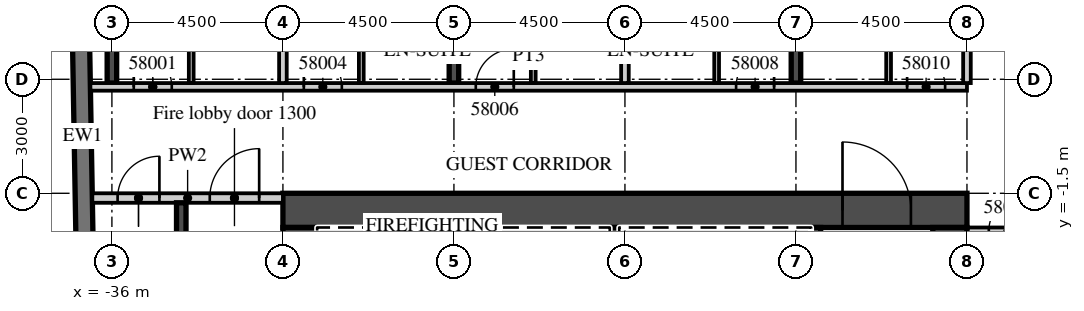
"""IFC4 building model, lengths in metres.
Left out: names, types, materials, properties, quantities, classifications, styles, units other than length and angle.
Written with IfcOpenShell. Run it as: python <this file> out.ifc"""

import sys

from ifc_helpers import new_model, si_unit, direction, frame, frame_2d, origin, place, context, subcontext, project, spatial, rectangle, extrude, element, fill, save


model = new_model("IFC4")
c1 = context("Model", 3, precision=1e-05, world=origin(), true_north=direction((0.0, 1.0)))
c2 = subcontext(c1, "Body", "Model", "MODEL_VIEW")
j1 = project(units=[si_unit("LENGTHUNIT", "METRE"), si_unit("PLANEANGLEUNIT", "RADIAN")], contexts=[c1])
p1 = place(None, origin())
s1 = spatial("IfcSite", under=j1, at=p1, CompositionType="ELEMENT")
p2 = place(p1, origin())
s2 = spatial("IfcBuilding", under=s1, at=p2, CompositionType="ELEMENT")
p3 = place(p2, frame((0.0, 0.0, 237.5)))
s3 = spatial("IfcBuildingStorey", under=s2, at=p3, CompositionType="ELEMENT", Elevation=237.5)
p4 = place(p3, frame((-36.0, 1.4, 0.0), z_axis=(0.0, 0.0, 1.0), x_axis=(0.0, 1.0, 0.0)))
e1 = element("IfcWall", 1, at=p4, inside=s3, PredefinedType="SHEAR", context=c2, shape_type="SweptSolid", body=[
    extrude(rectangle(XDim=17.125, YDim=0.25, at=frame_2d((8.563, 0.0))), origin(), (0.0, 0.0, 1.0), 3.3),
])
p5 = place(p3, frame((-27.0, 1.4, 0.0), z_axis=(0.0, 0.0, 1.0), x_axis=(0.0, 1.0, 0.0)))
e2 = element("IfcWall", 2, at=p5, inside=s3, PredefinedType="SHEAR", context=c2, shape_type="SweptSolid", body=[
    extrude(rectangle(XDim=18.817, YDim=0.25, at=frame_2d((9.409, 0.0))), origin(), (0.0, 0.0, 1.0), 3.3),
])
p6 = place(p3, frame((-18.0, 1.4, 0.0), z_axis=(0.0, 0.0, 1.0), x_axis=(0.0, 1.0, 0.0)))
e3 = element("IfcWall", 3, at=p6, inside=s3, PredefinedType="SHEAR", context=c2, shape_type="SweptSolid", body=[
    extrude(rectangle(XDim=18.974, YDim=0.25, at=frame_2d((9.487, 0.0))), origin(), (0.0, 0.0, 1.0), 3.3),
])
p7 = place(p3, frame((-37.057, 16.503, 0.0), z_axis=(0.0, 0.0, 1.0), x_axis=(0.017452279857, -0.999847697366, 0.0)))
e4 = element("IfcWall", 4, at=p7, inside=s3, PredefinedType="SOLIDWALL", context=c2, shape_type="SweptSolid", body=[
    extrude(rectangle(XDim=33.0, YDim=0.45, at=frame_2d((16.5, 0.0))), origin(), (0.0, 0.0, 1.0), 3.02),
])
p8 = place(p3, frame((-36.566, 1.3, 0.0), z_axis=(0.0, 0.0, 1.0), x_axis=(1.0, 0.0, 0.0)))
e5 = element("IfcWall", 5, at=p8, inside=s3, PredefinedType="PARTITIONING", context=c2, shape_type="SweptSolid", body=[
    extrude(rectangle(XDim=23.066, YDim=0.2, at=frame_2d((11.533, 0.0))), origin(), (0.0, 0.0, 1.0), 3.02),
])
p9 = place(p8, frame((1.141, 0.0, 0.0)))
e6 = element("IfcOpeningElement", 6, at=p9, cuts=e5, PredefinedType="OPENING", context=c2, shape_type="SweptSolid", body=[
    extrude(rectangle(XDim=1.0, YDim=2.1, at=frame_2d((0.5, 1.05))), frame((0.0, 0.11, 0.0), z_axis=(0.0, -1.0, 0.0), x_axis=(1.0, 0.0, 0.0)), (0.0, 0.0, 1.0), 0.22),
])
p10 = place(p8, frame((5.616, 0.0, 0.0)))
e7 = element("IfcOpeningElement", 7, at=p10, cuts=e5, PredefinedType="OPENING", context=c2, shape_type="SweptSolid", body=[
    extrude(rectangle(XDim=1.0, YDim=2.1, at=frame_2d((0.5, 1.05))), frame((0.0, 0.11, 0.0), z_axis=(0.0, -1.0, 0.0), x_axis=(1.0, 0.0, 0.0)), (0.0, 0.0, 1.0), 0.22),
])
p11 = place(p8, frame((10.141, 0.0, 0.0)))
e8 = element("IfcOpeningElement", 8, at=p11, cuts=e5, PredefinedType="OPENING", context=c2, shape_type="SweptSolid", body=[
    extrude(rectangle(XDim=1.0, YDim=2.1, at=frame_2d((0.5, 1.05))), frame((0.0, 0.11, 0.0), z_axis=(0.0, -1.0, 0.0), x_axis=(1.0, 0.0, 0.0)), (0.0, 0.0, 1.0), 0.22),
])
p12 = place(p8, frame((16.991, 0.0, 0.0)))
e9 = element("IfcOpeningElement", 9, at=p12, cuts=e5, PredefinedType="OPENING", context=c2, shape_type="SweptSolid", body=[
    extrude(rectangle(XDim=1.0, YDim=2.1, at=frame_2d((0.5, 1.05))), frame((0.0, 0.11, 0.0), z_axis=(0.0, -1.0, 0.0), x_axis=(1.0, 0.0, 0.0)), (0.0, 0.0, 1.0), 0.22),
])
p13 = place(p8, frame((21.491, 0.0, 0.0)))
e10 = element("IfcOpeningElement", 10, at=p13, cuts=e5, PredefinedType="OPENING", context=c2, shape_type="SweptSolid", body=[
    extrude(rectangle(XDim=1.0, YDim=2.1, at=frame_2d((0.5, 1.05))), frame((0.0, 0.11, 0.0), z_axis=(0.0, -1.0, 0.0), x_axis=(1.0, 0.0, 0.0)), (0.0, 0.0, 1.0), 0.22),
])
p14 = place(p3, frame((-31.5, 1.4, 0.0), z_axis=(0.0, 0.0, 1.0), x_axis=(0.0, 1.0, 0.0)))
e11 = element("IfcWall", 11, at=p14, inside=s3, PredefinedType="PARTITIONING", context=c2, shape_type="SweptSolid", body=[
    extrude(rectangle(XDim=18.751, YDim=0.2, at=frame_2d((9.375, 0.0))), origin(), (0.0, 0.0, 1.0), 3.02),
])
p15 = place(p3, frame((-33.913, 1.4, 0.0), z_axis=(0.0, 0.0, 1.0), x_axis=(0.0, 1.0, 0.0)))
e12 = element("IfcWall", 12, at=p15, inside=s3, PredefinedType="PARTITIONING", context=c2, shape_type="SweptSolid", body=[
    extrude(rectangle(XDim=3.725, YDim=0.125, at=frame_2d((1.863, 0.0))), origin(), (0.0, 0.0, 1.0), 3.02),
])
p16 = place(p15, frame((2.45, 0.0, 0.0)))
e13 = element("IfcOpeningElement", 13, at=p16, cuts=e12, PredefinedType="OPENING", context=c2, shape_type="SweptSolid", body=[
    extrude(rectangle(XDim=0.9, YDim=2.1, at=frame_2d((0.45, 1.05))), frame((0.0, 0.073, 0.0), z_axis=(0.0, -1.0, 0.0), x_axis=(1.0, 0.0, 0.0)), (0.0, 0.0, 1.0), 0.145),
])
p17 = place(p3, frame((-29.438, 1.4, 0.0), z_axis=(0.0, 0.0, 1.0), x_axis=(0.0, 1.0, 0.0)))
e14 = element("IfcWall", 14, at=p17, inside=s3, PredefinedType="PARTITIONING", context=c2, shape_type="SweptSolid", body=[
    extrude(rectangle(XDim=3.725, YDim=0.125, at=frame_2d((1.863, 0.0))), origin(), (0.0, 0.0, 1.0), 3.02),
])
p18 = place(p17, frame((2.45, 0.0, 0.0)))
e15 = element("IfcOpeningElement", 15, at=p18, cuts=e14, PredefinedType="OPENING", context=c2, shape_type="SweptSolid", body=[
    extrude(rectangle(XDim=0.9, YDim=2.1, at=frame_2d((0.45, 1.05))), frame((0.0, 0.073, 0.0), z_axis=(0.0, -1.0, 0.0), x_axis=(1.0, 0.0, 0.0)), (0.0, 0.0, 1.0), 0.145),
])
p19 = place(p3, frame((-22.5, 1.4, 0.0), z_axis=(0.0, 0.0, 1.0), x_axis=(0.0, 1.0, 0.0)))
e16 = element("IfcWall", 16, at=p19, inside=s3, PredefinedType="PARTITIONING", context=c2, shape_type="SweptSolid", body=[
    extrude(rectangle(XDim=18.908, YDim=0.2, at=frame_2d((9.454, 0.0))), origin(), (0.0, 0.0, 1.0), 3.02),
])
p20 = place(p3, frame((-24.913, 1.4, 0.0), z_axis=(0.0, 0.0, 1.0), x_axis=(0.0, 1.0, 0.0)))
e17 = element("IfcWall", 17, at=p20, inside=s3, PredefinedType="PARTITIONING", context=c2, shape_type="SweptSolid", body=[
    extrude(rectangle(XDim=3.725, YDim=0.125, at=frame_2d((1.863, 0.0))), origin(), (0.0, 0.0, 1.0), 3.02),
])
p21 = place(p20, frame((2.45, 0.0, 0.0)))
e18 = element("IfcOpeningElement", 18, at=p21, cuts=e17, PredefinedType="OPENING", context=c2, shape_type="SweptSolid", body=[
    extrude(rectangle(XDim=0.9, YDim=2.1, at=frame_2d((0.45, 1.05))), frame((0.0, 0.073, 0.0), z_axis=(0.0, -1.0, 0.0), x_axis=(1.0, 0.0, 0.0)), (0.0, 0.0, 1.0), 0.145),
])
p22 = place(p3, frame((-20.087, 1.4, 0.0), z_axis=(0.0, 0.0, 1.0), x_axis=(0.0, 1.0, 0.0)))
e19 = element("IfcWall", 19, at=p22, inside=s3, PredefinedType="PARTITIONING", context=c2, shape_type="SweptSolid", body=[
    extrude(rectangle(XDim=3.725, YDim=0.125, at=frame_2d((1.863, 0.0))), origin(), (0.0, 0.0, 1.0), 3.02),
])
p23 = place(p22, frame((2.45, 0.0, 0.0)))
e20 = element("IfcOpeningElement", 20, at=p23, cuts=e19, PredefinedType="OPENING", context=c2, shape_type="SweptSolid", body=[
    extrude(rectangle(XDim=0.9, YDim=2.1, at=frame_2d((0.45, 1.05))), frame((0.0, 0.073, 0.0), z_axis=(0.0, -1.0, 0.0), x_axis=(1.0, 0.0, 0.0)), (0.0, 0.0, 1.0), 0.145),
])
p24 = place(p3, frame((-13.5, 1.4, 0.0), z_axis=(0.0, 0.0, 1.0), x_axis=(0.0, 1.0, 0.0)))
e21 = element("IfcWall", 21, at=p24, inside=s3, PredefinedType="PARTITIONING", context=c2, shape_type="SweptSolid", body=[
    extrude(rectangle(XDim=19.065, YDim=0.2, at=frame_2d((9.533, 0.0))), origin(), (0.0, 0.0, 1.0), 3.02),
])
p25 = place(p3, frame((-15.562, 1.4, 0.0), z_axis=(0.0, 0.0, 1.0), x_axis=(0.0, 1.0, 0.0)))
e22 = element("IfcWall", 22, at=p25, inside=s3, PredefinedType="PARTITIONING", context=c2, shape_type="SweptSolid", body=[
    extrude(rectangle(XDim=3.725, YDim=0.125, at=frame_2d((1.863, 0.0))), origin(), (0.0, 0.0, 1.0), 3.02),
])
p26 = place(p25, frame((2.45, 0.0, 0.0)))
e23 = element("IfcOpeningElement", 23, at=p26, cuts=e22, PredefinedType="OPENING", context=c2, shape_type="SweptSolid", body=[
    extrude(rectangle(XDim=0.9, YDim=2.1, at=frame_2d((0.45, 1.05))), frame((0.0, 0.073, 0.0), z_axis=(0.0, -1.0, 0.0), x_axis=(1.0, 0.0, 0.0)), (0.0, 0.0, 1.0), 0.145),
])
p27 = place(p3, frame((-13.5, -2.5, 0.0), z_axis=(0.0, 0.0, 1.0), x_axis=(1.0, 0.0, 0.0)))
e24 = element("IfcWall", 24, at=p27, inside=s3, PredefinedType="PARTITIONING", context=c2, shape_type="SweptSolid", body=[
    extrude(rectangle(XDim=27.0, YDim=0.2, at=frame_2d((13.5, 0.0))), origin(), (0.0, 0.0, 1.0), 3.02),
])
p28 = place(p27, frame((0.575, 0.0, 0.0)))
e25 = element("IfcOpeningElement", 25, at=p28, cuts=e24, PredefinedType="OPENING", context=c2, shape_type="SweptSolid", body=[
    extrude(rectangle(XDim=1.0, YDim=2.1, at=frame_2d((0.5, 1.05))), frame((0.0, 0.11, 0.0), z_axis=(0.0, -1.0, 0.0), x_axis=(1.0, 0.0, 0.0)), (0.0, 0.0, 1.0), 0.22),
])
p29 = place(p27, frame((9.863, 0.0, 0.0)))
e26 = element("IfcOpeningElement", 26, at=p29, cuts=e24, PredefinedType="OPENING", context=c2, shape_type="SweptSolid", body=[
    extrude(rectangle(XDim=1.2, YDim=2.1, at=frame_2d((0.6, 1.05))), frame((0.0, 0.11, 0.0), z_axis=(0.0, -1.0, 0.0), x_axis=(1.0, 0.0, 0.0)), (0.0, 0.0, 1.0), 0.22),
])
p30 = place(p27, frame((15.938, 0.0, 0.0)))
e27 = element("IfcOpeningElement", 27, at=p30, cuts=e24, PredefinedType="OPENING", context=c2, shape_type="SweptSolid", body=[
    extrude(rectangle(XDim=1.2, YDim=2.1, at=frame_2d((0.6, 1.05))), frame((0.0, 0.11, 0.0), z_axis=(0.0, -1.0, 0.0), x_axis=(1.0, 0.0, 0.0)), (0.0, 0.0, 1.0), 0.22),
])
p31 = place(p27, frame((23.075, 0.0, 0.0)))
e28 = element("IfcOpeningElement", 28, at=p31, cuts=e24, PredefinedType="OPENING", context=c2, shape_type="SweptSolid", body=[
    extrude(rectangle(XDim=1.0, YDim=2.1, at=frame_2d((0.5, 1.05))), frame((0.0, 0.11, 0.0), z_axis=(0.0, -1.0, 0.0), x_axis=(1.0, 0.0, 0.0)), (0.0, 0.0, 1.0), 0.22),
])
p32 = place(p3, frame((-31.5, -1.95, 0.0), z_axis=(0.0, 0.0, 1.0), x_axis=(1.0, 0.0, 0.0)))
e29 = element("IfcWall", 29, at=p32, inside=s3, PredefinedType="SHEAR", context=c2, shape_type="SweptSolid", body=[
    extrude(rectangle(XDim=18.0, YDim=0.9, at=frame_2d((9.0, 0.0))), origin(), (0.0, 0.0, 1.0), 3.02),
])
p33 = place(p32, frame((14.725, 0.0, 0.0)))
e30 = element("IfcOpeningElement", 30, at=p33, cuts=e29, PredefinedType="OPENING", context=c2, shape_type="SweptSolid", body=[
    extrude(rectangle(XDim=1.8, YDim=2.1, at=frame_2d((0.9, 1.05))), frame((0.0, 0.46, 0.0), z_axis=(0.0, -1.0, 0.0), x_axis=(1.0, 0.0, 0.0)), (0.0, 0.0, 1.0), 0.92),
])
p34 = place(p3, frame((-31.05, -15.2, 0.0), z_axis=(0.0, 0.0, 1.0), x_axis=(0.0, 1.0, 0.0)))
e31 = element("IfcWall", 31, at=p34, inside=s3, PredefinedType="SHEAR", context=c2, shape_type="SweptSolid", body=[
    extrude(rectangle(XDim=12.8, YDim=0.9, at=frame_2d((6.4, 0.0))), origin(), (0.0, 0.0, 1.0), 3.02),
])
p35 = place(p34, frame((11.5, 0.0, 0.0)))
e32 = element("IfcOpeningElement", 32, at=p35, cuts=e31, PredefinedType="OPENING", context=c2, shape_type="SweptSolid", body=[
    extrude(rectangle(XDim=1.1, YDim=2.1, at=frame_2d((0.55, 1.05))), frame((0.0, 0.46, 0.0), z_axis=(0.0, -1.0, 0.0), x_axis=(1.0, 0.0, 0.0)), (0.0, 0.0, 1.0), 0.92),
])
p36 = place(p3, frame((-13.95, -14.6, 0.0), z_axis=(0.0, 0.0, 1.0), x_axis=(0.0, 1.0, 0.0)))
e33 = element("IfcWall", 33, at=p36, inside=s3, PredefinedType="SHEAR", context=c2, shape_type="SweptSolid", body=[
    extrude(rectangle(XDim=12.2, YDim=0.9, at=frame_2d((6.1, 0.0))), origin(), (0.0, 0.0, 1.0), 3.02),
])
p37 = place(p3, frame((-17.475, -5.55, 0.0), z_axis=(0.0, 0.0, 1.0), x_axis=(0.0, 1.0, 0.0)))
e34 = element("IfcWall", 34, at=p37, inside=s3, PredefinedType="SHEAR", context=c2, shape_type="SweptSolid", body=[
    extrude(rectangle(XDim=3.15, YDim=0.25, at=frame_2d((1.575, 0.0))), origin(), (0.0, 0.0, 1.0), 3.02),
])
for number, where, z_axis, x_axis in (
    (35, (-27.975, -5.3, 0.0), (0.0, 0.0, 1.0), (0.0, 1.0, 0.0)),
    (36, (-22.775, -5.3, 0.0), (0.0, 0.0, 1.0), (0.0, 1.0, 0.0)),
):
    element("IfcWall", number, at=place(p3, frame(where, z_axis=z_axis, x_axis=x_axis)), inside=s3, PredefinedType="SHEAR", context=c2, shape_type="SweptSolid", body=[
        extrude(rectangle(XDim=2.9, YDim=0.25, at=frame_2d((1.45, 0.0))), origin(), (0.0, 0.0, 1.0), 3.02),
    ])
p38 = place(p3, frame((-36.515, -1.625, 0.0), z_axis=(0.0, 0.0, 1.0), x_axis=(1.0, 0.0, 0.0)))
e37 = element("IfcWall", 37, at=p38, inside=s3, PredefinedType="PARTITIONING", context=c2, shape_type="SweptSolid", body=[
    extrude(rectangle(XDim=5.015, YDim=0.25, at=frame_2d((2.508, 0.0))), origin(), (0.0, 0.0, 1.0), 3.02),
])
p39 = place(p38, frame((3.09, 0.0, 0.0)))
e38 = element("IfcOpeningElement", 38, at=p39, cuts=e37, PredefinedType="OPENING", context=c2, shape_type="SweptSolid", body=[
    extrude(rectangle(XDim=1.3, YDim=2.1, at=frame_2d((0.65, 1.05))), frame((0.0, 0.135, 0.0), z_axis=(0.0, -1.0, 0.0), x_axis=(1.0, 0.0, 0.0)), (0.0, 0.0, 1.0), 0.27),
])
p40 = place(p38, frame((0.665, 0.0, 0.0)))
e39 = element("IfcOpeningElement", 39, at=p40, cuts=e37, PredefinedType="OPENING", context=c2, shape_type="SweptSolid", body=[
    extrude(rectangle(XDim=1.1, YDim=2.1, at=frame_2d((0.55, 1.05))), frame((0.0, 0.135, 0.0), z_axis=(0.0, -1.0, 0.0), x_axis=(1.0, 0.0, 0.0)), (0.0, 0.0, 1.0), 0.27),
])
p41 = place(p3, frame((-34.175, -10.1, 0.0), z_axis=(0.0, 0.0, 1.0), x_axis=(0.0, 1.0, 0.0)))
e40 = element("IfcWall", 40, at=p41, inside=s3, PredefinedType="SHEAR", context=c2, shape_type="SweptSolid", body=[
    extrude(rectangle(XDim=8.35, YDim=0.25, at=frame_2d((4.175, 0.0))), origin(), (0.0, 0.0, 1.0), 3.02),
])
p42 = place(p9, origin())
e41 = element("IfcDoor", 41, at=p42, inside=s3, OperationType="SINGLE_SWING_LEFT", PredefinedType="DOOR", context=c2, shape_type="SweptSolid", body=[
    extrude(rectangle(XDim=1.0, YDim=2.1, at=frame_2d((0.5, 1.05))), frame((0.0, 0.025, 0.0), z_axis=(0.0, -1.0, 0.0), x_axis=(1.0, 0.0, 0.0)), (0.0, 0.0, 1.0), 0.05),
])
fill(e6, e41)
p43 = place(p10, origin())
e42 = element("IfcDoor", 42, at=p43, inside=s3, OperationType="SINGLE_SWING_LEFT", PredefinedType="DOOR", context=c2, shape_type="SweptSolid", body=[
    extrude(rectangle(XDim=1.0, YDim=2.1, at=frame_2d((0.5, 1.05))), frame((0.0, 0.025, 0.0), z_axis=(0.0, -1.0, 0.0), x_axis=(1.0, 0.0, 0.0)), (0.0, 0.0, 1.0), 0.05),
])
fill(e7, e42)
p44 = place(p11, origin())
e43 = element("IfcDoor", 43, at=p44, inside=s3, OperationType="SINGLE_SWING_RIGHT", PredefinedType="DOOR", context=c2, shape_type="SweptSolid", body=[
    extrude(rectangle(XDim=1.0, YDim=2.1, at=frame_2d((0.5, 1.05))), frame((0.0, 0.025, 0.0), z_axis=(0.0, -1.0, 0.0), x_axis=(1.0, 0.0, 0.0)), (0.0, 0.0, 1.0), 0.05),
])
fill(e8, e43)
p45 = place(p12, origin())
e44 = element("IfcDoor", 44, at=p45, inside=s3, OperationType="SINGLE_SWING_RIGHT", PredefinedType="DOOR", context=c2, shape_type="SweptSolid", body=[
    extrude(rectangle(XDim=1.0, YDim=2.1, at=frame_2d((0.5, 1.05))), frame((0.0, 0.025, 0.0), z_axis=(0.0, -1.0, 0.0), x_axis=(1.0, 0.0, 0.0)), (0.0, 0.0, 1.0), 0.05),
])
fill(e9, e44)
p46 = place(p13, origin())
e45 = element("IfcDoor", 45, at=p46, inside=s3, OperationType="SINGLE_SWING_LEFT", PredefinedType="DOOR", context=c2, shape_type="SweptSolid", body=[
    extrude(rectangle(XDim=1.0, YDim=2.1, at=frame_2d((0.5, 1.05))), frame((0.0, 0.025, 0.0), z_axis=(0.0, -1.0, 0.0), x_axis=(1.0, 0.0, 0.0)), (0.0, 0.0, 1.0), 0.05),
])
fill(e10, e45)
p47 = place(p28, origin())
e46 = element("IfcDoor", 46, at=p47, inside=s3, OperationType="SINGLE_SWING_RIGHT", PredefinedType="DOOR", context=c2, shape_type="SweptSolid", body=[
    extrude(rectangle(XDim=1.0, YDim=2.1, at=frame_2d((0.5, 1.05))), frame((0.0, 0.025, 0.0), z_axis=(0.0, -1.0, 0.0), x_axis=(1.0, 0.0, 0.0)), (0.0, 0.0, 1.0), 0.05),
])
fill(e25, e46)
p48 = place(p33, origin())
e47 = element("IfcDoor", 47, at=p48, inside=s3, OperationType="DOUBLE_DOOR_DOUBLE_SWING", PredefinedType="DOOR", context=c2, shape_type="SweptSolid", body=[
    extrude(rectangle(XDim=1.8, YDim=2.1, at=frame_2d((0.9, 1.05))), frame((0.0, 0.025, 0.0), z_axis=(0.0, -1.0, 0.0), x_axis=(1.0, 0.0, 0.0)), (0.0, 0.0, 1.0), 0.05),
])
fill(e30, e47)
p49 = place(p39, origin())
e48 = element("IfcDoor", 48, at=p49, inside=s3, OperationType="SINGLE_SWING_RIGHT", PredefinedType="DOOR", context=c2, shape_type="SweptSolid", body=[
    extrude(rectangle(XDim=1.3, YDim=2.1, at=frame_2d((0.65, 1.05))), frame((0.0, 0.025, 0.0), z_axis=(0.0, -1.0, 0.0), x_axis=(1.0, 0.0, 0.0)), (0.0, 0.0, 1.0), 0.05),
])
fill(e38, e48)
p50 = place(p40, origin())
e49 = element("IfcDoor", 49, at=p50, inside=s3, OperationType="SINGLE_SWING_RIGHT", PredefinedType="DOOR", context=c2, shape_type="SweptSolid", body=[
    extrude(rectangle(XDim=1.1, YDim=2.1, at=frame_2d((0.55, 1.05))), frame((0.0, 0.025, 0.0), z_axis=(0.0, -1.0, 0.0), x_axis=(1.0, 0.0, 0.0)), (0.0, 0.0, 1.0), 0.05),
])
fill(e39, e49)
save(model, sys.argv[1])
